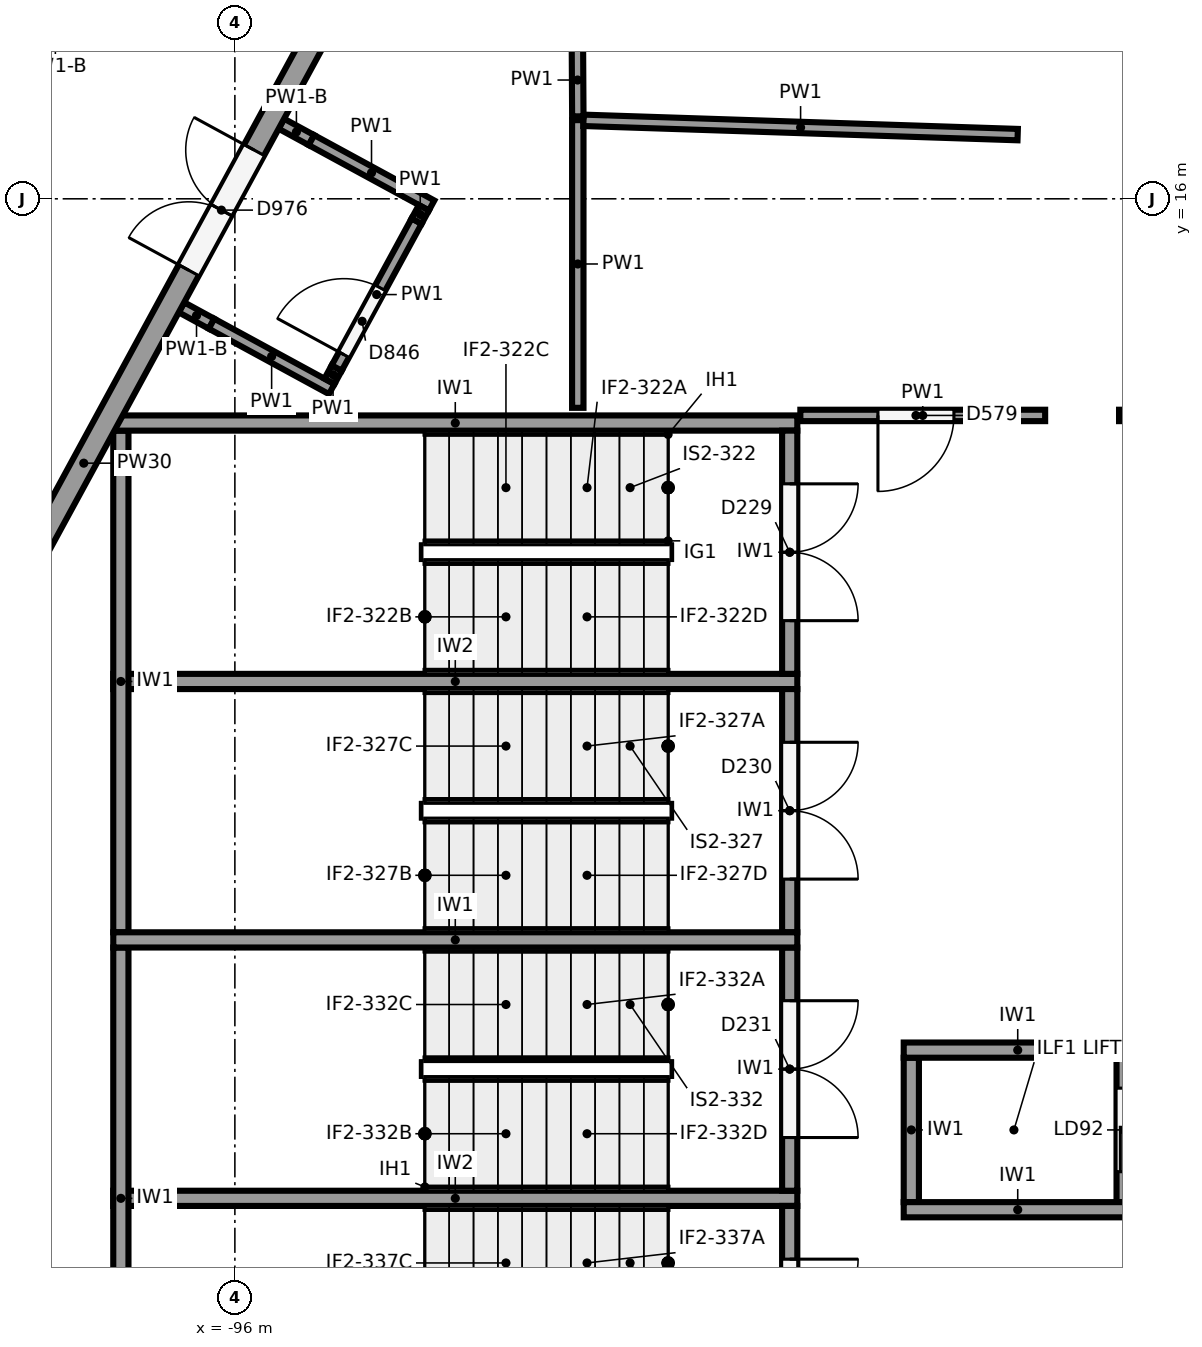
"""IFC4 building model, lengths in metres.
Left out: names, types, materials, properties, quantities, classifications, styles, units other than length and angle.
Written with IfcOpenShell. Run it as: python <this file> out.ifc"""

import sys

from ifc_helpers import new_model, si_unit, direction, frame, frame_2d, origin, origin_2d, place, context, subcontext, project, spatial, rectangle, circle, extrude, element, fill, save


model = new_model("IFC4")
c1 = context("Model", 3, precision=1e-05, world=origin(), true_north=direction((0.0, 1.0)))
c2 = subcontext(c1, "Body", "Model", "MODEL_VIEW")
j1 = project(units=[si_unit("LENGTHUNIT", "METRE"), si_unit("PLANEANGLEUNIT", "RADIAN")], contexts=[c1])
p1 = place(None, origin())
s1 = spatial("IfcSite", under=j1, at=p1, CompositionType="ELEMENT")
p2 = place(p1, origin())
s2 = spatial("IfcBuilding", under=s1, at=p2, CompositionType="ELEMENT")
p3 = place(p2, origin())
s3 = spatial("IfcBuildingStorey", under=s2, at=p3, CompositionType="ELEMENT", Elevation=0.0)
p4 = place(p3, frame((-84.973, 18.411, 0.0), z_axis=(0.0, 0.0, 1.0), x_axis=(1.0, 0.0, 0.0)))
e1 = element("IfcColumn", 1, at=p4, inside=s3, PredefinedType="COLUMN", context=c2, shape_type="SweptSolid", body=[
    extrude(circle(Radius=0.5, at=origin_2d()), origin(), (0.0, 0.0, 1.0), 6.5),
])
p5 = place(p3, frame((-84.998, 6.081, 0.0), z_axis=(0.0, 0.0, 1.0), x_axis=(1.0, 0.0, 0.0)))
e2 = element("IfcColumn", 2, at=p5, inside=s3, PredefinedType="COLUMN", context=c2, shape_type="SweptSolid", body=[
    extrude(circle(Radius=0.6, at=origin_2d()), origin(), (0.0, 0.0, 1.0), 6.5),
])
p6 = place(p3, frame((-101.161, 6.689, 0.0), z_axis=(0.0, 0.0, 1.0), x_axis=(0.477867771117, 0.878431780691, 0.0)))
e3 = element("IfcWall", 3, at=p6, inside=s3, PredefinedType="SOLIDWALL", context=c2, shape_type="SweptSolid", body=[
    extrude(rectangle(XDim=13.28, YDim=0.3, at=frame_2d((6.64, 0.0))), origin(), (0.0, 0.0, 1.0), 4.85),
])
p7 = place(p6, frame((9.53, 0.0, 0.0)))
e4 = element("IfcOpeningElement", 4, at=p7, cuts=e3, PredefinedType="OPENING", context=c2, shape_type="SweptSolid", body=[
    extrude(rectangle(XDim=1.8, YDim=2.4, at=frame_2d((0.9, 1.2))), frame((0.0, 0.16, 0.0), z_axis=(0.0, -1.0, 0.0), x_axis=(1.0, 0.0, 0.0)), (0.0, 0.0, 1.0), 0.32),
])
p8 = place(p3, frame((-94.815, -5.855, 0.0), z_axis=(0.0, 0.0, 1.0), x_axis=(-0.477867771117, 0.878431780691, 0.0)))
e5 = element("IfcWall", 5, at=p8, inside=s3, PredefinedType="SOLIDWALL", context=c2, shape_type="SweptSolid", body=[
    extrude(rectangle(XDim=13.28, YDim=0.35, at=frame_2d((6.64, 0.0))), origin(), (0.0, 0.0, 1.0), 4.85),
])
for number, where, z_axis, x_axis in (
    (6, (-97.6, 13.05, 0.0), (0.0, 0.0, 1.0), (1.0, 0.0, 0.0)),
    (7, (-97.6, 6.25, 0.0), (0.0, 0.0, 1.0), (1.0, 0.0, 0.0)),
):
    element("IfcWall", number, at=place(p3, frame(where, z_axis=z_axis, x_axis=x_axis)), inside=s3, PredefinedType="SHEAR", context=c2, shape_type="SweptSolid", body=[
        extrude(rectangle(XDim=9.0, YDim=0.2, at=frame_2d((4.5, 0.0))), origin(), (0.0, 0.0, 1.0), 6.15),
    ])
for number, where, z_axis, x_axis in (
    (8, (-97.5, 12.95, 0.0), (0.0, 0.0, 1.0), (0.0, -1.0, 0.0)),
    (9, (-97.5, 6.15, 0.0), (0.0, 0.0, 1.0), (0.0, -1.0, 0.0)),
):
    element("IfcWall", number, at=place(p3, frame(where, z_axis=z_axis, x_axis=x_axis)), inside=s3, PredefinedType="SHEAR", context=c2, shape_type="SweptSolid", body=[
        extrude(rectangle(XDim=6.6, YDim=0.2, at=frame_2d((3.3, 0.0))), origin(), (0.0, 0.0, 1.0), 6.15),
    ])
for number, where, z_axis, x_axis in (
    (10, (-97.6, 9.65, 0.0), (0.0, 0.0, 1.0), (1.0, 0.0, 0.0)),
    (11, (-97.6, 2.85, 0.0), (0.0, 0.0, 1.0), (1.0, 0.0, 0.0)),
):
    element("IfcWall", number, at=place(p3, frame(where, z_axis=z_axis, x_axis=x_axis)), inside=s3, PredefinedType="SHEAR", context=c2, shape_type="SweptSolid", body=[
        extrude(rectangle(XDim=9.0, YDim=0.2, at=frame_2d((4.5, 0.0))), origin(), (0.0, 0.0, 1.0), 6.15),
    ])
p9 = place(p3, frame((-88.7, 12.95, 0.0), z_axis=(0.0, 0.0, 1.0), x_axis=(0.0, -1.0, 0.0)))
e12 = element("IfcWall", 12, at=p9, inside=s3, PredefinedType="SHEAR", context=c2, shape_type="SweptSolid", body=[
    extrude(rectangle(XDim=3.2, YDim=0.2, at=frame_2d((1.6, 0.0))), origin(), (0.0, 0.0, 1.0), 6.15),
])
p10 = place(p9, frame((0.7, 0.0, 0.0)))
e13 = element("IfcOpeningElement", 13, at=p10, cuts=e12, PredefinedType="OPENING", context=c2, shape_type="SweptSolid", body=[
    extrude(rectangle(XDim=1.8, YDim=2.1, at=frame_2d((0.9, 1.05))), frame((0.0, 0.11, 0.0), z_axis=(0.0, -1.0, 0.0), x_axis=(1.0, 0.0, 0.0)), (0.0, 0.0, 1.0), 0.22),
])
p11 = place(p3, frame((-88.7, 9.55, 0.0), z_axis=(0.0, 0.0, 1.0), x_axis=(0.0, -1.0, 0.0)))
e14 = element("IfcWall", 14, at=p11, inside=s3, PredefinedType="SHEAR", context=c2, shape_type="SweptSolid", body=[
    extrude(rectangle(XDim=3.2, YDim=0.2, at=frame_2d((1.6, 0.0))), origin(), (0.0, 0.0, 1.0), 6.15),
])
p12 = place(p11, frame((0.7, 0.0, 0.0)))
e15 = element("IfcOpeningElement", 15, at=p12, cuts=e14, PredefinedType="OPENING", context=c2, shape_type="SweptSolid", body=[
    extrude(rectangle(XDim=1.8, YDim=2.1, at=frame_2d((0.9, 1.05))), frame((0.0, 0.11, 0.0), z_axis=(0.0, -1.0, 0.0), x_axis=(1.0, 0.0, 0.0)), (0.0, 0.0, 1.0), 0.22),
])
p13 = place(p3, frame((-88.7, 6.15, 0.0), z_axis=(0.0, 0.0, 1.0), x_axis=(0.0, -1.0, 0.0)))
e16 = element("IfcWall", 16, at=p13, inside=s3, PredefinedType="SHEAR", context=c2, shape_type="SweptSolid", body=[
    extrude(rectangle(XDim=3.2, YDim=0.2, at=frame_2d((1.6, 0.0))), origin(), (0.0, 0.0, 1.0), 6.15),
])
p14 = place(p13, frame((0.7, 0.0, 0.0)))
e17 = element("IfcOpeningElement", 17, at=p14, cuts=e16, PredefinedType="OPENING", context=c2, shape_type="SweptSolid", body=[
    extrude(rectangle(XDim=1.8, YDim=2.1, at=frame_2d((0.9, 1.05))), frame((0.0, 0.11, 0.0), z_axis=(0.0, -1.0, 0.0), x_axis=(1.0, 0.0, 0.0)), (0.0, 0.0, 1.0), 0.22),
])
p15 = place(p3, frame((-88.7, 2.75, 0.0), z_axis=(0.0, 0.0, 1.0), x_axis=(0.0, -1.0, 0.0)))
e18 = element("IfcWall", 18, at=p15, inside=s3, PredefinedType="SHEAR", context=c2, shape_type="SweptSolid", body=[
    extrude(rectangle(XDim=3.2, YDim=0.2, at=frame_2d((1.6, 0.0))), origin(), (0.0, 0.0, 1.0), 6.15),
])
p16 = place(p15, frame((0.7, 0.0, 0.0)))
e19 = element("IfcOpeningElement", 19, at=p16, cuts=e18, PredefinedType="OPENING", context=c2, shape_type="SweptSolid", body=[
    extrude(rectangle(XDim=1.8, YDim=2.1, at=frame_2d((0.9, 1.05))), frame((0.0, 0.11, 0.0), z_axis=(0.0, -1.0, 0.0), x_axis=(1.0, 0.0, 0.0)), (0.0, 0.0, 1.0), 0.22),
])
for number, where, z_axis, x_axis in (
    (20, (-87.2, 4.8, 0.0), (0.0, 0.0, 1.0), (1.0, 0.0, 0.0)),
    (21, (-87.2, 2.7, 0.0), (0.0, 0.0, 1.0), (1.0, 0.0, 0.0)),
):
    element("IfcWall", number, at=place(p3, frame(where, z_axis=z_axis, x_axis=x_axis)), inside=s3, PredefinedType="SHEAR", context=c2, shape_type="SweptSolid", body=[
        extrude(rectangle(XDim=3.0, YDim=0.2, at=frame_2d((1.5, 0.0))), origin(), (0.0, 0.0, 1.0), 6.15),
    ])
p17 = place(p3, frame((-87.1, 4.7, 0.0), z_axis=(0.0, 0.0, 1.0), x_axis=(0.0, -1.0, 0.0)))
e22 = element("IfcWall", 22, at=p17, inside=s3, PredefinedType="SHEAR", context=c2, shape_type="SweptSolid", body=[
    extrude(rectangle(XDim=1.9, YDim=0.2, at=frame_2d((0.95, 0.0))), origin(), (0.0, 0.0, 1.0), 6.15),
])
p18 = place(p3, frame((-84.3, 4.7, 0.0), z_axis=(0.0, 0.0, 1.0), x_axis=(0.0, -1.0, 0.0)))
e23 = element("IfcWall", 23, at=p18, inside=s3, PredefinedType="SHEAR", context=c2, shape_type="SweptSolid", body=[
    extrude(rectangle(XDim=1.9, YDim=0.2, at=frame_2d((0.95, 0.0))), origin(), (0.0, 0.0, 1.0), 6.15),
])
p19 = place(p18, frame((0.4, 0.0, 0.0)))
e24 = element("IfcOpeningElement", 24, at=p19, cuts=e23, PredefinedType="OPENING", context=c2, shape_type="SweptSolid", body=[
    extrude(rectangle(XDim=1.1, YDim=2.1, at=frame_2d((0.55, 1.05))), frame((0.0, 0.11, 0.0), z_axis=(0.0, -1.0, 0.0), x_axis=(1.0, 0.0, 0.0)), (0.0, 0.0, 1.0), 0.22),
])
p20 = place(p3, frame((-91.488, 13.25, 0.0), z_axis=(0.0, 0.0, 1.0), x_axis=(6.4503644e-05, 0.99999999792, 0.0)))
e25 = element("IfcWall", 25, at=p20, inside=s3, PredefinedType="PARTITIONING", context=c2, shape_type="SweptSolid", body=[
    extrude(rectangle(XDim=3.785, YDim=0.15, at=frame_2d((1.893, 0.0))), origin(), (0.0, 0.0, 1.0), 6.15),
])
p21 = place(p3, frame((-91.413, 17.032, 0.0), z_axis=(0.0, 0.0, 1.0), x_axis=(0.999458991221, -0.032889586018, 0.0)))
e26 = element("IfcWall", 26, at=p21, inside=s3, PredefinedType="PARTITIONING", context=c2, shape_type="SweptSolid", body=[
    extrude(rectangle(XDim=5.716, YDim=0.15, at=frame_2d((2.858, 0.0))), origin(), (0.0, 0.0, 1.0), 6.15),
])
p22 = place(p3, frame((-85.339, 13.15, 0.0), z_axis=(0.0, 0.0, 1.0), x_axis=(-1.0, 0.0, 0.0)))
e27 = element("IfcWall", 27, at=p22, inside=s3, PredefinedType="PARTITIONING", context=c2, shape_type="SweptSolid", body=[
    extrude(rectangle(XDim=3.221, YDim=0.15, at=frame_2d((1.61, 0.0))), origin(), (0.0, 0.0, 1.0), 6.15),
])
p23 = place(p22, frame((1.2, 0.0, 0.0)))
e28 = element("IfcOpeningElement", 28, at=p23, cuts=e27, PredefinedType="OPENING", context=c2, shape_type="SweptSolid", body=[
    extrude(rectangle(XDim=1.0, YDim=2.1, at=frame_2d((0.5, 1.05))), frame((0.0, 0.085, 0.0), z_axis=(0.0, -1.0, 0.0), x_axis=(1.0, 0.0, 0.0)), (0.0, 0.0, 1.0), 0.17),
])
p24 = place(p3, frame((-81.675, 13.15, 0.0), z_axis=(0.0, 0.0, 1.0), x_axis=(-1.0, 0.0, 0.0)))
e29 = element("IfcWall", 29, at=p24, inside=s3, PredefinedType="PARTITIONING", context=c2, shape_type="SweptSolid", body=[
    extrude(rectangle(XDim=2.692, YDim=0.15, at=frame_2d((1.346, 0.0))), origin(), (0.0, 0.0, 1.0), 6.15),
])
p25 = place(p3, frame((-91.488, 17.085, 0.0), z_axis=(0.0, 0.0, 1.0), x_axis=(-0.005877741553, 0.999982725928, 0.0)))
e30 = element("IfcWall", 30, at=p25, inside=s3, PredefinedType="PARTITIONING", context=c2, shape_type="SweptSolid", body=[
    extrude(rectangle(XDim=0.955, YDim=0.15, at=frame_2d((0.478, 0.0))), origin(), (0.0, 0.0, 1.0), 6.15),
])
p26 = place(p3, frame((-96.702, 14.572, 0.0), z_axis=(0.0, 0.0, 1.0), x_axis=(0.878372019733, -0.477977609256, 0.0)))
e31 = element("IfcWall", 31, at=p26, inside=s3, PredefinedType="PARTITIONING", context=c2, shape_type="SweptSolid", body=[
    extrude(rectangle(XDim=0.45, YDim=0.15, at=frame_2d((0.225, 0.0))), origin(), (0.0, 0.0, 1.0), 4.85),
])
p27 = place(p3, frame((-96.307, 14.357, 0.0), z_axis=(0.0, 0.0, 1.0), x_axis=(0.878428962466, -0.477872951632, 0.0)))
e32 = element("IfcWall", 32, at=p27, inside=s3, PredefinedType="PARTITIONING", context=c2, shape_type="SweptSolid", body=[
    extrude(rectangle(XDim=1.8, YDim=0.15, at=frame_2d((0.9, 0.0))), origin(), (0.0, 0.0, 1.0), 6.15),
])
p28 = place(p3, frame((-95.388, 16.987, 0.0), z_axis=(0.0, 0.0, 1.0), x_axis=(0.878372019733, -0.477977609256, 0.0)))
e33 = element("IfcWall", 33, at=p28, inside=s3, PredefinedType="PARTITIONING", context=c2, shape_type="SweptSolid", body=[
    extrude(rectangle(XDim=0.45, YDim=0.15, at=frame_2d((0.225, 0.0))), origin(), (0.0, 0.0, 1.0), 4.85),
])
p29 = place(p3, frame((-94.993, 16.772, 0.0), z_axis=(0.0, 0.0, 1.0), x_axis=(0.878459932885, -0.477816017223, 0.0)))
e34 = element("IfcWall", 34, at=p29, inside=s3, PredefinedType="PARTITIONING", context=c2, shape_type="SweptSolid", body=[
    extrude(rectangle(XDim=1.8, YDim=0.15, at=frame_2d((0.9, 0.0))), origin(), (0.0, 0.0, 1.0), 6.15),
])
p30 = place(p3, frame((-94.756, 13.598, 0.0), z_axis=(0.0, 0.0, 1.0), x_axis=(0.478168266369, 0.878268244352, 0.0)))
e35 = element("IfcWall", 35, at=p30, inside=s3, PredefinedType="PARTITIONING", context=c2, shape_type="SweptSolid", body=[
    extrude(rectangle(XDim=0.2, YDim=0.15, at=frame_2d((0.1, 0.0))), origin(), (0.0, 0.0, 1.0), 6.15),
])
p31 = place(p3, frame((-94.66, 13.774, 0.0), z_axis=(0.0, 0.0, 1.0), x_axis=(0.477887643273, 0.878420969927, 0.0)))
e36 = element("IfcWall", 36, at=p31, inside=s3, PredefinedType="PARTITIONING", context=c2, shape_type="SweptSolid", body=[
    extrude(rectangle(XDim=2.2, YDim=0.15, at=frame_2d((1.1, 0.0))), origin(), (0.0, 0.0, 1.0), 6.15),
])
p32 = place(p31, frame((0.2, 0.0, 0.0)))
e37 = element("IfcOpeningElement", 37, at=p32, cuts=e36, PredefinedType="OPENING", context=c2, shape_type="SweptSolid", body=[
    extrude(rectangle(XDim=1.0, YDim=2.1, at=frame_2d((0.5, 1.05))), frame((0.0, 0.085, 0.0), z_axis=(0.0, -1.0, 0.0), x_axis=(1.0, 0.0, 0.0)), (0.0, 0.0, 1.0), 0.17),
])
p33 = place(p3, frame((-93.609, 15.706, 0.0), z_axis=(0.0, 0.0, 1.0), x_axis=(0.477226530971, 0.878780312785, 0.0)))
e38 = element("IfcWall", 38, at=p33, inside=s3, PredefinedType="PARTITIONING", context=c2, shape_type="SweptSolid", body=[
    extrude(rectangle(XDim=0.2, YDim=0.15, at=frame_2d((0.1, 0.0))), origin(), (0.0, 0.0, 1.0), 6.15),
])
p34 = place(p7, origin())
e39 = element("IfcDoor", 39, at=p34, inside=s3, OperationType="DOUBLE_DOOR_SINGLE_SWING", PredefinedType="DOOR", context=c2, shape_type="SweptSolid", body=[
    extrude(rectangle(XDim=1.8, YDim=2.4, at=frame_2d((0.9, 1.2))), frame((0.0, 0.025, 0.0), z_axis=(0.0, -1.0, 0.0), x_axis=(1.0, 0.0, 0.0)), (0.0, 0.0, 1.0), 0.05),
])
fill(e4, e39)
p35 = place(p10, origin())
e40 = element("IfcDoor", 40, at=p35, inside=s3, OperationType="DOUBLE_DOOR_SINGLE_SWING", PredefinedType="DOOR", context=c2, shape_type="SweptSolid", body=[
    extrude(rectangle(XDim=1.8, YDim=2.1, at=frame_2d((0.9, 1.05))), frame((0.0, 0.025, 0.0), z_axis=(0.0, -1.0, 0.0), x_axis=(1.0, 0.0, 0.0)), (0.0, 0.0, 1.0), 0.05),
])
fill(e13, e40)
p36 = place(p12, origin())
e41 = element("IfcDoor", 41, at=p36, inside=s3, OperationType="DOUBLE_DOOR_SINGLE_SWING", PredefinedType="DOOR", context=c2, shape_type="SweptSolid", body=[
    extrude(rectangle(XDim=1.8, YDim=2.1, at=frame_2d((0.9, 1.05))), frame((0.0, 0.025, 0.0), z_axis=(0.0, -1.0, 0.0), x_axis=(1.0, 0.0, 0.0)), (0.0, 0.0, 1.0), 0.05),
])
fill(e15, e41)
p37 = place(p14, origin())
e42 = element("IfcDoor", 42, at=p37, inside=s3, OperationType="DOUBLE_DOOR_SINGLE_SWING", PredefinedType="DOOR", context=c2, shape_type="SweptSolid", body=[
    extrude(rectangle(XDim=1.8, YDim=2.1, at=frame_2d((0.9, 1.05))), frame((0.0, 0.025, 0.0), z_axis=(0.0, -1.0, 0.0), x_axis=(1.0, 0.0, 0.0)), (0.0, 0.0, 1.0), 0.05),
])
fill(e17, e42)
p38 = place(p16, origin())
e43 = element("IfcDoor", 43, at=p38, inside=s3, OperationType="DOUBLE_DOOR_SINGLE_SWING", PredefinedType="DOOR", context=c2, shape_type="SweptSolid", body=[
    extrude(rectangle(XDim=1.8, YDim=2.1, at=frame_2d((0.9, 1.05))), frame((0.0, 0.025, 0.0), z_axis=(0.0, -1.0, 0.0), x_axis=(1.0, 0.0, 0.0)), (0.0, 0.0, 1.0), 0.05),
])
fill(e19, e43)
p39 = place(p19, origin())
e44 = element("IfcDoor", 44, at=p39, inside=s3, OperationType="SLIDING_TO_RIGHT", PredefinedType="DOOR", context=c2, shape_type="SweptSolid", body=[
    extrude(rectangle(XDim=1.1, YDim=2.1, at=frame_2d((0.55, 1.05))), frame((0.0, 0.025, 0.0), z_axis=(0.0, -1.0, 0.0), x_axis=(1.0, 0.0, 0.0)), (0.0, 0.0, 1.0), 0.05),
])
fill(e24, e44)
p40 = place(p23, origin())
e45 = element("IfcDoor", 45, at=p40, inside=s3, OperationType="SINGLE_SWING_RIGHT", PredefinedType="DOOR", context=c2, shape_type="SweptSolid", body=[
    extrude(rectangle(XDim=1.0, YDim=2.1, at=frame_2d((0.5, 1.05))), frame((0.0, 0.025, 0.0), z_axis=(0.0, -1.0, 0.0), x_axis=(1.0, 0.0, 0.0)), (0.0, 0.0, 1.0), 0.05),
])
fill(e28, e45)
p41 = place(p32, origin())
e46 = element("IfcDoor", 46, at=p41, inside=s3, OperationType="SINGLE_SWING_LEFT", PredefinedType="DOOR", context=c2, shape_type="SweptSolid", body=[
    extrude(rectangle(XDim=1.0, YDim=2.1, at=frame_2d((0.5, 1.05))), frame((0.0, 0.025, 0.0), z_axis=(0.0, -1.0, 0.0), x_axis=(1.0, 0.0, 0.0)), (0.0, 0.0, 1.0), 0.05),
])
fill(e37, e46)
save(model, sys.argv[1])
